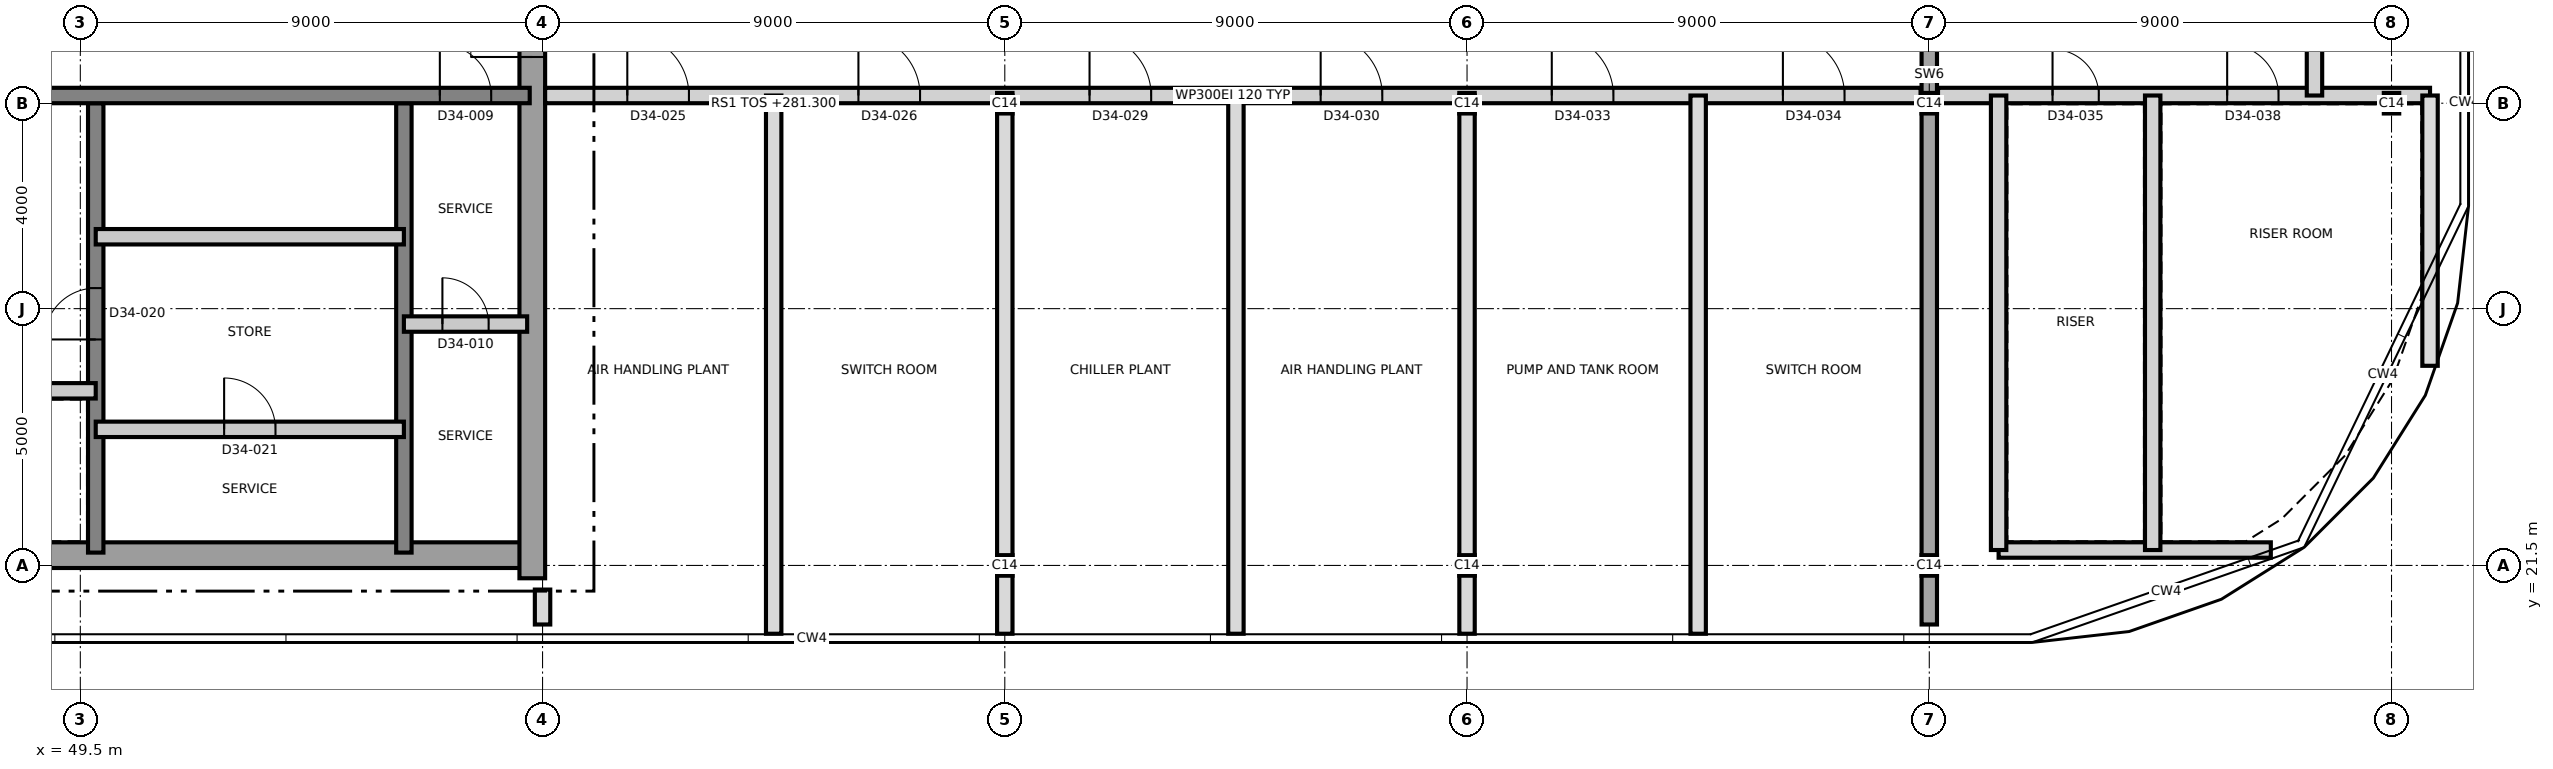
"""IFC4 building model, lengths in metres.
Left out: names, types, materials, properties, quantities, classifications, styles, units other than length and angle.
Written with IfcOpenShell. Run it as: python <this file> out.ifc"""

import sys

from ifc_helpers import new_model, si_unit, direction, frame, frame_2d, origin, origin_2d, place, context, subcontext, project, spatial, polyline, rectangle, i_section, outline, extrude, element, fill, save


model = new_model("IFC4")
c1 = context("Model", 3, precision=1e-05, world=origin(), true_north=direction((0.0, 1.0)))
c2 = subcontext(c1, "Body", "Model", "MODEL_VIEW")
j1 = project(units=[si_unit("LENGTHUNIT", "METRE"), si_unit("PLANEANGLEUNIT", "RADIAN")], contexts=[c1])
p1 = place(None, origin())
s1 = spatial("IfcSite", under=j1, at=p1, CompositionType="ELEMENT")
p2 = place(p1, origin())
s2 = spatial("IfcBuilding", under=s1, at=p2, CompositionType="ELEMENT")
p3 = place(p2, frame((0.0, 0.0, 281.3)))
s3 = spatial("IfcBuildingStorey", under=s2, at=p3, CompositionType="ELEMENT", Elevation=281.3)
p4 = place(p3, frame((31.25, 21.7, 0.0), z_axis=(0.0, 0.0, 1.0), x_axis=(1.0, 0.0, 0.0)))
e1 = element("IfcWall", 1, at=p4, inside=s3, PredefinedType="SHEAR", context=c2, shape_type="SweptSolid", body=[
    extrude(rectangle(XDim=27.0, YDim=0.5, at=frame_2d((13.5, 0.0))), origin(), (0.0, 0.0, 1.0), 4.2),
])
p5 = place(p3, frame((58.3, 21.25, 0.0), z_axis=(0.0, 0.0, 1.0), x_axis=(0.0, 1.0, 0.0)))
e2 = element("IfcWall", 2, at=p5, inside=s3, PredefinedType="SHEAR", context=c2, shape_type="SweptSolid", body=[
    extrude(outline(polyline([(0.0, 0.0), (18.5, 0.0), (18.5, 2.12), (15.441, 4.2), (0.0, 4.2), (0.0, 0.0)])), frame((0.0, 0.25, 0.0), z_axis=(0.0, -1.0, 0.0), x_axis=(1.0, 0.0, 0.0)), (0.0, 0.0, 1.0), 0.5),
])
p6 = place(p5, frame((10.15, 0.0, 0.0)))
e3 = element("IfcOpeningElement", 3, at=p6, cuts=e2, PredefinedType="OPENING", context=c2, shape_type="SweptSolid", body=[
    extrude(rectangle(XDim=1.2, YDim=2.1, at=frame_2d((0.6, 1.05))), frame((0.0, 0.26, 0.0), z_axis=(0.0, -1.0, 0.0), x_axis=(1.0, 0.0, 0.0)), (0.0, 0.0, 1.0), 0.52),
])
p7 = place(p3, frame((49.8, 21.75, 0.0), z_axis=(0.0, 0.0, 1.0), x_axis=(0.0, 1.0, 0.0)))
e4 = element("IfcWall", 4, at=p7, inside=s3, PredefinedType="SHEAR", context=c2, shape_type="SweptSolid", body=[
    extrude(rectangle(XDim=8.75, YDim=0.3, at=frame_2d((4.375, 0.0))), origin(), (0.0, 0.0, 1.0), 4.2),
])
p8 = place(p7, frame((4.15, 0.0, 0.0)))
e5 = element("IfcOpeningElement", 5, at=p8, cuts=e4, PredefinedType="OPENING", context=c2, shape_type="SweptSolid", body=[
    extrude(rectangle(XDim=1.0, YDim=2.1, at=frame_2d((0.5, 1.05))), frame((0.0, 0.16, 0.0), z_axis=(0.0, -1.0, 0.0), x_axis=(1.0, 0.0, 0.0)), (0.0, 0.0, 1.0), 0.32),
])
p9 = place(p3, frame((55.8, 21.75, 0.0), z_axis=(0.0, 0.0, 1.0), x_axis=(0.0, 1.0, 0.0)))
e6 = element("IfcWall", 6, at=p9, inside=s3, PredefinedType="SHEAR", context=c2, shape_type="SweptSolid", body=[
    extrude(rectangle(XDim=8.75, YDim=0.3, at=frame_2d((4.375, 0.0))), origin(), (0.0, 0.0, 1.0), 4.2),
])
p10 = place(p3, frame((31.75, 30.65, 0.0), z_axis=(0.0, 0.0, 1.0), x_axis=(1.0, 0.0, 0.0)))
e7 = element("IfcWall", 7, at=p10, inside=s3, PredefinedType="SHEAR", context=c2, shape_type="SweptSolid", body=[
    extrude(rectangle(XDim=26.5, YDim=0.3, at=frame_2d((13.25, 0.0))), origin(), (0.0, 0.0, 1.0), 4.2),
])
p11 = place(p10, frame((24.75, 0.0, 0.0)))
e8 = element("IfcOpeningElement", 8, at=p11, cuts=e7, PredefinedType="OPENING", context=c2, shape_type="SweptSolid", body=[
    extrude(rectangle(XDim=1.0, YDim=2.1, at=frame_2d((0.5, 1.05))), frame((0.0, 0.16, 0.0), z_axis=(0.0, -1.0, 0.0), x_axis=(1.0, 0.0, 0.0)), (0.0, 0.0, 1.0), 0.32),
])
p12 = place(p10, frame((4.05, 0.0, 0.0)))
e9 = element("IfcOpeningElement", 9, at=p12, cuts=e7, PredefinedType="OPENING", context=c2, shape_type="SweptSolid", body=[
    extrude(rectangle(XDim=1.0, YDim=2.1, at=frame_2d((0.5, 1.05))), frame((0.0, 0.16, 0.0), z_axis=(0.0, -1.0, 0.0), x_axis=(1.0, 0.0, 0.0)), (0.0, 0.0, 1.0), 0.32),
])
p13 = place(p10, frame((11.55, 0.0, 0.0)))
e10 = element("IfcOpeningElement", 10, at=p13, cuts=e7, PredefinedType="OPENING", context=c2, shape_type="SweptSolid", body=[
    extrude(rectangle(XDim=1.0, YDim=2.1, at=frame_2d((0.5, 1.05))), frame((0.0, 0.16, 0.0), z_axis=(0.0, -1.0, 0.0), x_axis=(1.0, 0.0, 0.0)), (0.0, 0.0, 1.0), 0.32),
])
p14 = place(p3, frame((85.5, 20.35, 0.0), z_axis=(0.0, 0.0, 1.0), x_axis=(0.0, 1.0, 0.0)))
e11 = element("IfcWall", 11, at=p14, inside=s3, PredefinedType="SHEAR", context=c2, shape_type="SweptSolid", body=[
    extrude(outline(polyline([(0.0, 0.0), (20.3, 0.0), (20.3, 1.508), (16.341, 4.2), (0.0, 4.2), (0.0, 0.0)])), frame((0.0, 0.15, 0.0), z_axis=(0.0, -1.0, 0.0), x_axis=(1.0, 0.0, 0.0)), (0.0, 0.0, 1.0), 0.3),
])
p15 = place(p14, frame((11.35, 0.0, 0.0)))
e12 = element("IfcOpeningElement", 12, at=p15, cuts=e11, PredefinedType="OPENING", context=c2, shape_type="SweptSolid", body=[
    extrude(rectangle(XDim=1.4, YDim=2.1, at=frame_2d((0.7, 1.05))), frame((0.0, 0.16, 0.0), z_axis=(0.0, -1.0, 0.0), x_axis=(1.0, 0.0, 0.0)), (0.0, 0.0, 1.0), 0.32),
])
for number, where, z_axis, x_axis in (
    (13, (67.5, 21.5, 0.0), (0.0, 0.0, 1.0), (1.0, 0.0, 0.0)),
    (14, (67.5, 30.5, 0.0), (0.0, 0.0, 1.0), (1.0, 0.0, 0.0)),
    (15, (76.5, 21.5, 0.0), (0.0, 0.0, 1.0), (1.0, 0.0, 0.0)),
    (16, (76.5, 30.5, 0.0), (0.0, 0.0, 1.0), (1.0, 0.0, 0.0)),
    (17, (85.5, 21.5, 0.0), (0.0, 0.0, 1.0), (1.0, 0.0, 0.0)),
    (18, (85.5, 30.5, 0.0), (0.0, 0.0, 1.0), (1.0, 0.0, 0.0)),
    (19, (94.5, 30.5, 0.0), (0.0, 0.0, 1.0), (1.0, 0.0, 0.0)),
):
    element("IfcColumn", number, at=place(p3, frame(where, z_axis=z_axis, x_axis=x_axis)), inside=s3, PredefinedType="COLUMN", context=c2, shape_type="SweptSolid", body=[
        extrude(i_section(OverallWidth=0.3, OverallDepth=0.4, WebThickness=0.013, FlangeThickness=0.024, FilletRadius=0.027, at=origin_2d()), origin(), (0.0, 0.0, 1.0), 4.2),
    ])
p16 = place(p3, frame((49.8, 24.15, 0.0), z_axis=(0.0, 0.0, 1.0), x_axis=(1.0, 0.0, 0.0)))
e20 = element("IfcWall", 20, at=p16, inside=s3, PredefinedType="PARTITIONING", context=c2, shape_type="SweptSolid", body=[
    extrude(rectangle(XDim=6.0, YDim=0.3, at=frame_2d((3.0, 0.0))), origin(), (0.0, 0.0, 1.0), 3.9),
])
p17 = place(p16, frame((2.5, 0.0, 0.0)))
e21 = element("IfcOpeningElement", 21, at=p17, cuts=e20, PredefinedType="OPENING", context=c2, shape_type="SweptSolid", body=[
    extrude(rectangle(XDim=1.0, YDim=2.1, at=frame_2d((0.5, 1.05))), frame((0.0, 0.16, 0.0), z_axis=(0.0, -1.0, 0.0), x_axis=(1.0, 0.0, 0.0)), (0.0, 0.0, 1.0), 0.32),
])
p18 = place(p3, frame((46.8, 24.9, 0.0), z_axis=(0.0, 0.0, 1.0), x_axis=(1.0, 0.0, 0.0)))
e22 = element("IfcWall", 22, at=p18, inside=s3, PredefinedType="PARTITIONING", context=c2, shape_type="SweptSolid", body=[
    extrude(rectangle(XDim=3.0, YDim=0.3, at=frame_2d((1.5, 0.0))), origin(), (0.0, 0.0, 1.0), 3.9),
])
p19 = place(p18, frame((1.05, 0.0, 0.0)))
e23 = element("IfcOpeningElement", 23, at=p19, cuts=e22, PredefinedType="OPENING", context=c2, shape_type="SweptSolid", body=[
    extrude(rectangle(XDim=0.9, YDim=2.1, at=frame_2d((0.45, 1.05))), frame((0.0, 0.16, 0.0), z_axis=(0.0, -1.0, 0.0), x_axis=(1.0, 0.0, 0.0)), (0.0, 0.0, 1.0), 0.32),
])
p20 = place(p3, frame((55.8, 26.2, 0.0), z_axis=(0.0, 0.0, 1.0), x_axis=(1.0, 0.0, 0.0)))
e24 = element("IfcWall", 24, at=p20, inside=s3, PredefinedType="PARTITIONING", context=c2, shape_type="SweptSolid", body=[
    extrude(rectangle(XDim=2.4, YDim=0.3, at=frame_2d((1.2, 0.0))), origin(), (0.0, 0.0, 1.0), 3.9),
])
p21 = place(p20, frame((0.75, 0.0, 0.0)))
e25 = element("IfcOpeningElement", 25, at=p21, cuts=e24, PredefinedType="OPENING", context=c2, shape_type="SweptSolid", body=[
    extrude(rectangle(XDim=0.9, YDim=2.1, at=frame_2d((0.45, 1.05))), frame((0.0, 0.16, 0.0), z_axis=(0.0, -1.0, 0.0), x_axis=(1.0, 0.0, 0.0)), (0.0, 0.0, 1.0), 0.32),
])
p22 = place(p3, frame((49.8, 27.9, 0.0), z_axis=(0.0, 0.0, 1.0), x_axis=(1.0, 0.0, 0.0)))
e26 = element("IfcWall", 26, at=p22, inside=s3, PredefinedType="PARTITIONING", context=c2, shape_type="SweptSolid", body=[
    extrude(rectangle(XDim=6.0, YDim=0.3, at=frame_2d((3.0, 0.0))), origin(), (0.0, 0.0, 1.0), 3.9),
])
p23 = place(p3, frame((86.85, 21.8, 0.0), z_axis=(0.0, 0.0, 1.0), x_axis=(1.0, 0.0, 0.0)))
e27 = element("IfcWall", 27, at=p23, inside=s3, PredefinedType="PARTITIONING", context=c2, shape_type="SweptSolid", body=[
    extrude(rectangle(XDim=5.3, YDim=0.3, at=frame_2d((2.65, 0.0))), origin(), (0.0, 0.0, 1.0), 3.9),
])
p24 = place(p3, frame((58.55, 30.65, 0.0), z_axis=(0.0, 0.0, 1.0), x_axis=(1.0, 0.0, 0.0)))
e28 = element("IfcWall", 28, at=p24, inside=s3, PredefinedType="PARTITIONING", context=c2, shape_type="SweptSolid", body=[
    extrude(rectangle(XDim=26.78, YDim=0.3, at=frame_2d((13.39, 0.0))), origin(), (0.0, 0.0, 1.0), 3.9),
])
p25 = place(p24, frame((1.6, 0.0, 0.0)))
e29 = element("IfcOpeningElement", 29, at=p25, cuts=e28, PredefinedType="OPENING", context=c2, shape_type="SweptSolid", body=[
    extrude(rectangle(XDim=1.2, YDim=2.1, at=frame_2d((0.6, 1.05))), frame((0.0, 0.16, 0.0), z_axis=(0.0, -1.0, 0.0), x_axis=(1.0, 0.0, 0.0)), (0.0, 0.0, 1.0), 0.32),
])
p26 = place(p24, frame((6.1, 0.0, 0.0)))
e30 = element("IfcOpeningElement", 30, at=p26, cuts=e28, PredefinedType="OPENING", context=c2, shape_type="SweptSolid", body=[
    extrude(rectangle(XDim=1.2, YDim=2.1, at=frame_2d((0.6, 1.05))), frame((0.0, 0.16, 0.0), z_axis=(0.0, -1.0, 0.0), x_axis=(1.0, 0.0, 0.0)), (0.0, 0.0, 1.0), 0.32),
])
p27 = place(p24, frame((10.6, 0.0, 0.0)))
e31 = element("IfcOpeningElement", 31, at=p27, cuts=e28, PredefinedType="OPENING", context=c2, shape_type="SweptSolid", body=[
    extrude(rectangle(XDim=1.2, YDim=2.1, at=frame_2d((0.6, 1.05))), frame((0.0, 0.16, 0.0), z_axis=(0.0, -1.0, 0.0), x_axis=(1.0, 0.0, 0.0)), (0.0, 0.0, 1.0), 0.32),
])
p28 = place(p24, frame((15.1, 0.0, 0.0)))
e32 = element("IfcOpeningElement", 32, at=p28, cuts=e28, PredefinedType="OPENING", context=c2, shape_type="SweptSolid", body=[
    extrude(rectangle(XDim=1.2, YDim=2.1, at=frame_2d((0.6, 1.05))), frame((0.0, 0.16, 0.0), z_axis=(0.0, -1.0, 0.0), x_axis=(1.0, 0.0, 0.0)), (0.0, 0.0, 1.0), 0.32),
])
p29 = place(p24, frame((19.6, 0.0, 0.0)))
e33 = element("IfcOpeningElement", 33, at=p29, cuts=e28, PredefinedType="OPENING", context=c2, shape_type="SweptSolid", body=[
    extrude(rectangle(XDim=1.2, YDim=2.1, at=frame_2d((0.6, 1.05))), frame((0.0, 0.16, 0.0), z_axis=(0.0, -1.0, 0.0), x_axis=(1.0, 0.0, 0.0)), (0.0, 0.0, 1.0), 0.32),
])
p30 = place(p24, frame((24.1, 0.0, 0.0)))
e34 = element("IfcOpeningElement", 34, at=p30, cuts=e28, PredefinedType="OPENING", context=c2, shape_type="SweptSolid", body=[
    extrude(rectangle(XDim=1.2, YDim=2.1, at=frame_2d((0.6, 1.05))), frame((0.0, 0.16, 0.0), z_axis=(0.0, -1.0, 0.0), x_axis=(1.0, 0.0, 0.0)), (0.0, 0.0, 1.0), 0.32),
])
p31 = place(p3, frame((85.67, 30.65, 0.0), z_axis=(0.0, 0.0, 1.0), x_axis=(1.0, 0.0, 0.0)))
e35 = element("IfcWall", 35, at=p31, inside=s3, PredefinedType="PARTITIONING", context=c2, shape_type="SweptSolid", body=[
    extrude(rectangle(XDim=9.58, YDim=0.3, at=frame_2d((4.79, 0.0))), origin(), (0.0, 0.0, 1.0), 3.9),
])
p32 = place(p31, frame((2.23, 0.0, 0.0)))
e36 = element("IfcOpeningElement", 36, at=p32, cuts=e35, PredefinedType="OPENING", context=c2, shape_type="SweptSolid", body=[
    extrude(rectangle(XDim=0.9, YDim=2.1, at=frame_2d((0.45, 1.05))), frame((0.0, 0.16, 0.0), z_axis=(0.0, -1.0, 0.0), x_axis=(1.0, 0.0, 0.0)), (0.0, 0.0, 1.0), 0.32),
])
p33 = place(p31, frame((5.63, 0.0, 0.0)))
e37 = element("IfcOpeningElement", 37, at=p33, cuts=e35, PredefinedType="OPENING", context=c2, shape_type="SweptSolid", body=[
    extrude(rectangle(XDim=1.0, YDim=2.1, at=frame_2d((0.5, 1.05))), frame((0.0, 0.16, 0.0), z_axis=(0.0, -1.0, 0.0), x_axis=(1.0, 0.0, 0.0)), (0.0, 0.0, 1.0), 0.32),
])
p34 = place(p3, frame((58.5, 20.35, 0.0), z_axis=(0.0, 0.0, 1.0), x_axis=(0.0, 1.0, 0.0)))
e38 = element("IfcWall", 38, at=p34, inside=s3, PredefinedType="PARTITIONING", context=c2, shape_type="SweptSolid", body=[
    extrude(rectangle(XDim=0.68, YDim=0.3, at=frame_2d((0.34, 0.0))), origin(), (0.0, 0.0, 1.0), 3.9),
])
for number, where, z_axis, x_axis in (
    (39, (63.0, 20.17, 0.0), (0.0, 0.0, 1.0), (0.0, 1.0, 0.0)),
    (40, (67.5, 20.17, 0.0), (0.0, 0.0, 1.0), (0.0, 1.0, 0.0)),
    (41, (72.0, 20.17, 0.0), (0.0, 0.0, 1.0), (0.0, 1.0, 0.0)),
    (42, (76.5, 20.17, 0.0), (0.0, 0.0, 1.0), (0.0, 1.0, 0.0)),
    (43, (81.0, 20.17, 0.0), (0.0, 0.0, 1.0), (0.0, 1.0, 0.0)),
):
    element("IfcWall", number, at=place(p3, frame(where, z_axis=z_axis, x_axis=x_axis)), inside=s3, PredefinedType="PARTITIONING", context=c2, shape_type="SweptSolid", body=[
        extrude(rectangle(XDim=10.48, YDim=0.3, at=frame_2d((5.24, 0.0))), origin(), (0.0, 0.0, 1.0), 3.9),
    ])
for number, where, z_axis, x_axis in (
    (44, (86.85, 21.8, 0.0), (0.0, 0.0, 1.0), (0.0, 1.0, 0.0)),
    (45, (89.85, 21.8, 0.0), (0.0, 0.0, 1.0), (0.0, 1.0, 0.0)),
):
    element("IfcWall", number, at=place(p3, frame(where, z_axis=z_axis, x_axis=x_axis)), inside=s3, PredefinedType="PARTITIONING", context=c2, shape_type="SweptSolid", body=[
        extrude(rectangle(XDim=8.85, YDim=0.3, at=frame_2d((4.425, 0.0))), origin(), (0.0, 0.0, 1.0), 3.9),
    ])
p35 = place(p3, frame((93.0, 30.65, 0.0), z_axis=(0.0, 0.0, 1.0), x_axis=(0.0, 1.0, 0.0)))
e46 = element("IfcWall", 46, at=p35, inside=s3, PredefinedType="PARTITIONING", context=c2, shape_type="SweptSolid", body=[
    extrude(rectangle(XDim=2.7, YDim=0.3, at=frame_2d((1.35, 0.0))), origin(), (0.0, 0.0, 1.0), 3.9),
])
p36 = place(p3, frame((95.25, 25.387, 0.0), z_axis=(0.0, 0.0, 1.0), x_axis=(0.0, 1.0, 0.0)))
e47 = element("IfcWall", 47, at=p36, inside=s3, PredefinedType="PARTITIONING", context=c2, shape_type="SweptSolid", body=[
    extrude(rectangle(XDim=5.263, YDim=0.3, at=frame_2d((2.631, 0.0))), origin(), (0.0, 0.0, 1.0), 3.9),
])
p37 = place(p11, origin())
e48 = element("IfcDoor", 48, at=p37, inside=s3, OperationType="SINGLE_SWING_LEFT", PredefinedType="DOOR", context=c2, shape_type="SweptSolid", body=[
    extrude(rectangle(XDim=1.0, YDim=2.1, at=frame_2d((0.5, 1.05))), frame((0.0, 0.025, 0.0), z_axis=(0.0, -1.0, 0.0), x_axis=(1.0, 0.0, 0.0)), (0.0, 0.0, 1.0), 0.05),
])
fill(e8, e48)
p38 = place(p21, origin())
e49 = element("IfcDoor", 49, at=p38, inside=s3, OperationType="SINGLE_SWING_RIGHT", PredefinedType="DOOR", context=c2, shape_type="SweptSolid", body=[
    extrude(rectangle(XDim=0.9, YDim=2.1, at=frame_2d((0.45, 1.05))), frame((0.0, 0.025, 0.0), z_axis=(0.0, -1.0, 0.0), x_axis=(1.0, 0.0, 0.0)), (0.0, 0.0, 1.0), 0.05),
])
fill(e25, e49)
p39 = place(p6, origin())
e50 = element("IfcDoor", 50, at=p39, inside=s3, OperationType="SINGLE_SWING_LEFT", PredefinedType="DOOR", context=c2, shape_type="SweptSolid", body=[
    extrude(rectangle(XDim=1.2, YDim=2.1, at=frame_2d((0.6, 1.05))), frame((0.0, 0.025, 0.0), z_axis=(0.0, -1.0, 0.0), x_axis=(1.0, 0.0, 0.0)), (0.0, 0.0, 1.0), 0.05),
])
fill(e3, e50)
p40 = place(p8, origin())
e51 = element("IfcDoor", 51, at=p40, inside=s3, OperationType="SINGLE_SWING_LEFT", PredefinedType="DOOR", context=c2, shape_type="SweptSolid", body=[
    extrude(rectangle(XDim=1.0, YDim=2.1, at=frame_2d((0.5, 1.05))), frame((0.0, 0.025, 0.0), z_axis=(0.0, -1.0, 0.0), x_axis=(1.0, 0.0, 0.0)), (0.0, 0.0, 1.0), 0.05),
])
fill(e5, e51)
p41 = place(p17, origin())
e52 = element("IfcDoor", 52, at=p41, inside=s3, OperationType="SINGLE_SWING_RIGHT", PredefinedType="DOOR", context=c2, shape_type="SweptSolid", body=[
    extrude(rectangle(XDim=1.0, YDim=2.1, at=frame_2d((0.5, 1.05))), frame((0.0, 0.025, 0.0), z_axis=(0.0, -1.0, 0.0), x_axis=(1.0, 0.0, 0.0)), (0.0, 0.0, 1.0), 0.05),
])
fill(e21, e52)
p42 = place(p25, origin())
e53 = element("IfcDoor", 53, at=p42, inside=s3, OperationType="SINGLE_SWING_RIGHT", PredefinedType="DOOR", context=c2, shape_type="SweptSolid", body=[
    extrude(rectangle(XDim=1.2, YDim=2.1, at=frame_2d((0.6, 1.05))), frame((0.0, 0.025, 0.0), z_axis=(0.0, -1.0, 0.0), x_axis=(1.0, 0.0, 0.0)), (0.0, 0.0, 1.0), 0.05),
])
fill(e29, e53)
p43 = place(p26, origin())
e54 = element("IfcDoor", 54, at=p43, inside=s3, OperationType="SINGLE_SWING_LEFT", PredefinedType="DOOR", context=c2, shape_type="SweptSolid", body=[
    extrude(rectangle(XDim=1.2, YDim=2.1, at=frame_2d((0.6, 1.05))), frame((0.0, 0.025, 0.0), z_axis=(0.0, -1.0, 0.0), x_axis=(1.0, 0.0, 0.0)), (0.0, 0.0, 1.0), 0.05),
])
fill(e30, e54)
p44 = place(p27, origin())
e55 = element("IfcDoor", 55, at=p44, inside=s3, OperationType="SINGLE_SWING_LEFT", PredefinedType="DOOR", context=c2, shape_type="SweptSolid", body=[
    extrude(rectangle(XDim=1.2, YDim=2.1, at=frame_2d((0.6, 1.05))), frame((0.0, 0.025, 0.0), z_axis=(0.0, -1.0, 0.0), x_axis=(1.0, 0.0, 0.0)), (0.0, 0.0, 1.0), 0.05),
])
fill(e31, e55)
p45 = place(p28, origin())
e56 = element("IfcDoor", 56, at=p45, inside=s3, OperationType="SINGLE_SWING_LEFT", PredefinedType="DOOR", context=c2, shape_type="SweptSolid", body=[
    extrude(rectangle(XDim=1.2, YDim=2.1, at=frame_2d((0.6, 1.05))), frame((0.0, 0.025, 0.0), z_axis=(0.0, -1.0, 0.0), x_axis=(1.0, 0.0, 0.0)), (0.0, 0.0, 1.0), 0.05),
])
fill(e32, e56)
p46 = place(p29, origin())
e57 = element("IfcDoor", 57, at=p46, inside=s3, OperationType="SINGLE_SWING_LEFT", PredefinedType="DOOR", context=c2, shape_type="SweptSolid", body=[
    extrude(rectangle(XDim=1.2, YDim=2.1, at=frame_2d((0.6, 1.05))), frame((0.0, 0.025, 0.0), z_axis=(0.0, -1.0, 0.0), x_axis=(1.0, 0.0, 0.0)), (0.0, 0.0, 1.0), 0.05),
])
fill(e33, e57)
p47 = place(p30, origin())
e58 = element("IfcDoor", 58, at=p47, inside=s3, OperationType="SINGLE_SWING_RIGHT", PredefinedType="DOOR", context=c2, shape_type="SweptSolid", body=[
    extrude(rectangle(XDim=1.2, YDim=2.1, at=frame_2d((0.6, 1.05))), frame((0.0, 0.025, 0.0), z_axis=(0.0, -1.0, 0.0), x_axis=(1.0, 0.0, 0.0)), (0.0, 0.0, 1.0), 0.05),
])
fill(e34, e58)
p48 = place(p32, origin())
e59 = element("IfcDoor", 59, at=p48, inside=s3, OperationType="SINGLE_SWING_LEFT", PredefinedType="DOOR", context=c2, shape_type="SweptSolid", body=[
    extrude(rectangle(XDim=0.9, YDim=2.1, at=frame_2d((0.45, 1.05))), frame((0.0, 0.025, 0.0), z_axis=(0.0, -1.0, 0.0), x_axis=(1.0, 0.0, 0.0)), (0.0, 0.0, 1.0), 0.05),
])
fill(e36, e59)
p49 = place(p33, origin())
e60 = element("IfcDoor", 60, at=p49, inside=s3, OperationType="SINGLE_SWING_LEFT", PredefinedType="DOOR", context=c2, shape_type="SweptSolid", body=[
    extrude(rectangle(XDim=1.0, YDim=2.1, at=frame_2d((0.5, 1.05))), frame((0.0, 0.025, 0.0), z_axis=(0.0, -1.0, 0.0), x_axis=(1.0, 0.0, 0.0)), (0.0, 0.0, 1.0), 0.05),
])
fill(e37, e60)
save(model, sys.argv[1])
